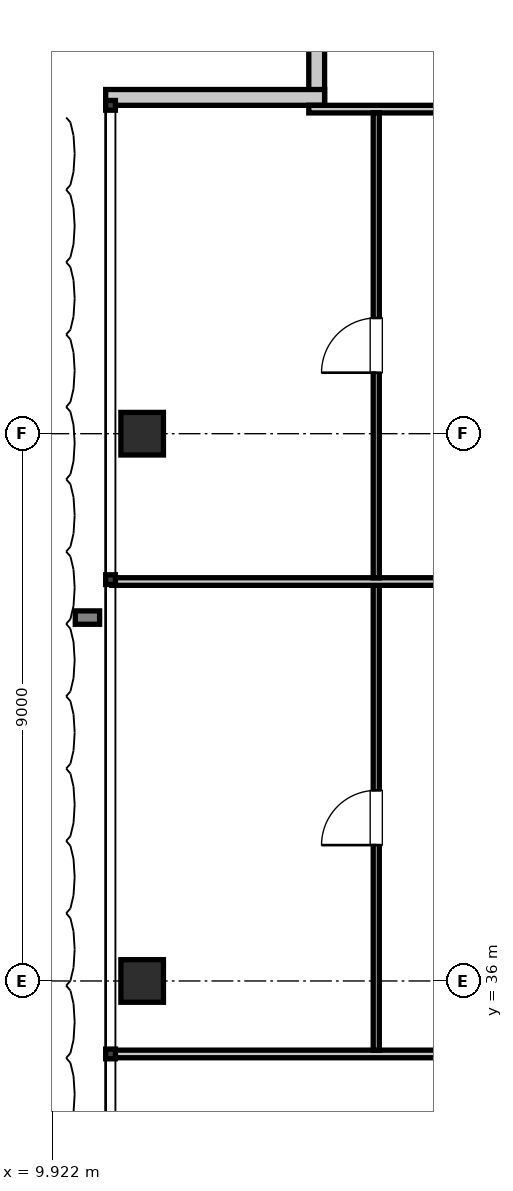
"""IFC4 building model, lengths in metres.
Left out: names, types, materials, properties, quantities, classifications, styles, units other than length and angle.
Written with IfcOpenShell. Run it as: python <this file> out.ifc"""

import sys

from ifc_helpers import new_model, si_unit, direction, frame, frame_2d, origin, origin_2d, place, context, subcontext, project, spatial, rectangle, i_section, extrude, element, fill, save


model = new_model("IFC4")
c1 = context("Model", 3, precision=1e-05, world=origin(), true_north=direction((0.0, 1.0)))
c2 = subcontext(c1, "Body", "Model", "MODEL_VIEW")
j1 = project(units=[si_unit("LENGTHUNIT", "METRE"), si_unit("PLANEANGLEUNIT", "RADIAN")], contexts=[c1])
p1 = place(None, origin())
s1 = spatial("IfcSite", under=j1, at=p1, CompositionType="ELEMENT")
p2 = place(p1, origin())
s2 = spatial("IfcBuilding", under=s1, at=p2, CompositionType="ELEMENT")
p3 = place(p2, frame((0.0, 0.0, 61.6)))
s3 = spatial("IfcBuildingStorey", under=s2, at=p3, CompositionType="ELEMENT", Elevation=61.6)
for number, where, z_axis, x_axis in (
    (1, (11.4, 36.0, 0.0), (0.0, 0.0, 1.0), (1.0, 0.0, 0.0)),
    (2, (11.4, 45.0, 0.0), (0.0, 0.0, 1.0), (1.0, 0.0, 0.0)),
):
    element("IfcColumn", number, at=place(p3, frame(where, z_axis=z_axis, x_axis=x_axis)), inside=s3, PredefinedType="COLUMN", context=c2, shape_type="SweptSolid", body=[
        extrude(i_section(OverallWidth=0.7, OverallDepth=0.7, WebThickness=0.028, FlangeThickness=0.044, at=origin_2d()), origin(), (0.0, 0.0, 1.0), 3.85),
    ])
p4 = place(p3, frame((14.27, 50.4, 0.0), z_axis=(0.0, 0.0, 1.0), x_axis=(0.0, 1.0, 0.0)))
e3 = element("IfcWall", 3, at=p4, inside=s3, PredefinedType="SOLIDWALL", context=c2, shape_type="SweptSolid", body=[
    extrude(rectangle(XDim=3.6, YDim=0.26, at=frame_2d((1.8, 0.0))), origin(), (0.0, 0.0, 1.0), 3.61),
])
p5 = place(p3, frame((10.8, 50.53, 0.0), z_axis=(0.0, 0.0, 1.0), x_axis=(1.0, 0.0, 0.0)))
e4 = element("IfcWall", 4, at=p5, inside=s3, PredefinedType="SOLIDWALL", context=c2, shape_type="SweptSolid", body=[
    extrude(rectangle(XDim=3.6, YDim=0.26, at=frame_2d((1.8, 0.0))), origin(), (0.0, 0.0, 1.0), 3.61),
])
p6 = place(p3, frame((10.9, 34.8, 0.0), z_axis=(0.0, 0.0, 1.0), x_axis=(1.0, 0.0, 0.0)))
e5 = element("IfcWall", 5, at=p6, inside=s3, PredefinedType="PARTITIONING", context=c2, shape_type="SweptSolid", body=[
    extrude(rectangle(XDim=11.62, YDim=0.125, at=frame_2d((5.81, 0.0))), origin(), (0.0, 0.0, 1.0), 3.61),
])
p7 = place(p3, frame((14.14, 50.337, 0.0), z_axis=(0.0, 0.0, 1.0), x_axis=(1.0, 0.0, 0.0)))
e6 = element("IfcWall", 6, at=p7, inside=s3, PredefinedType="PARTITIONING", context=c2, shape_type="SweptSolid", body=[
    extrude(rectangle(XDim=8.38, YDim=0.125, at=frame_2d((4.19, 0.0))), origin(), (0.0, 0.0, 1.0), 3.61),
])
p8 = place(p3, frame((15.25, 34.86, 0.0), z_axis=(0.0, 0.0, 1.0), x_axis=(0.0, 1.0, 0.0)))
e7 = element("IfcWall", 7, at=p8, inside=s3, PredefinedType="PARTITIONING", context=c2, shape_type="SweptSolid", body=[
    extrude(rectangle(XDim=7.649, YDim=0.1, at=frame_2d((3.824, 0.0))), origin(), (0.0, 0.0, 1.0), 3.61),
])
p9 = place(p8, frame((3.374, 0.0, 0.0)))
e8 = element("IfcOpeningElement", 8, at=p9, cuts=e7, PredefinedType="OPENING", context=c2, shape_type="SweptSolid", body=[
    extrude(rectangle(XDim=0.9, YDim=2.1, at=frame_2d((0.45, 1.05))), frame((0.0, 0.06, 0.0), z_axis=(0.0, -1.0, 0.0), x_axis=(1.0, 0.0, 0.0)), (0.0, 0.0, 1.0), 0.12),
])
p10 = place(p3, frame((10.9, 42.569, 0.0), z_axis=(0.0, 0.0, 1.0), x_axis=(1.0, 0.0, 0.0)))
e9 = element("IfcWall", 9, at=p10, inside=s3, PredefinedType="PARTITIONING", context=c2, shape_type="SweptSolid", body=[
    extrude(rectangle(XDim=11.62, YDim=0.125, at=frame_2d((5.81, 0.0))), origin(), (0.0, 0.0, 1.0), 3.61),
])
p11 = place(p3, frame((15.25, 42.629, 0.0), z_axis=(0.0, 0.0, 1.0), x_axis=(0.0, 1.0, 0.0)))
e10 = element("IfcWall", 10, at=p11, inside=s3, PredefinedType="PARTITIONING", context=c2, shape_type="SweptSolid", body=[
    extrude(rectangle(XDim=7.649, YDim=0.1, at=frame_2d((3.824, 0.0))), origin(), (0.0, 0.0, 1.0), 3.61),
])
p12 = place(p11, frame((3.375, 0.0, 0.0)))
e11 = element("IfcOpeningElement", 11, at=p12, cuts=e10, PredefinedType="OPENING", context=c2, shape_type="SweptSolid", body=[
    extrude(rectangle(XDim=0.9, YDim=2.1, at=frame_2d((0.45, 1.05))), frame((0.0, 0.06, 0.0), z_axis=(0.0, -1.0, 0.0), x_axis=(1.0, 0.0, 0.0)), (0.0, 0.0, 1.0), 0.12),
])
p13 = place(p9, origin())
e12 = element("IfcDoor", 12, at=p13, inside=s3, OperationType="SINGLE_SWING_LEFT", PredefinedType="DOOR", context=c2, shape_type="SweptSolid", body=[
    extrude(rectangle(XDim=0.9, YDim=2.1, at=frame_2d((0.45, 1.05))), frame((0.0, 0.025, 0.0), z_axis=(0.0, -1.0, 0.0), x_axis=(1.0, 0.0, 0.0)), (0.0, 0.0, 1.0), 0.05),
])
fill(e8, e12)
p14 = place(p12, origin())
e13 = element("IfcDoor", 13, at=p14, inside=s3, OperationType="SINGLE_SWING_LEFT", PredefinedType="DOOR", context=c2, shape_type="SweptSolid", body=[
    extrude(rectangle(XDim=0.9, YDim=2.1, at=frame_2d((0.45, 1.05))), frame((0.0, 0.025, 0.0), z_axis=(0.0, -1.0, 0.0), x_axis=(1.0, 0.0, 0.0)), (0.0, 0.0, 1.0), 0.05),
])
fill(e11, e13)
save(model, sys.argv[1])
